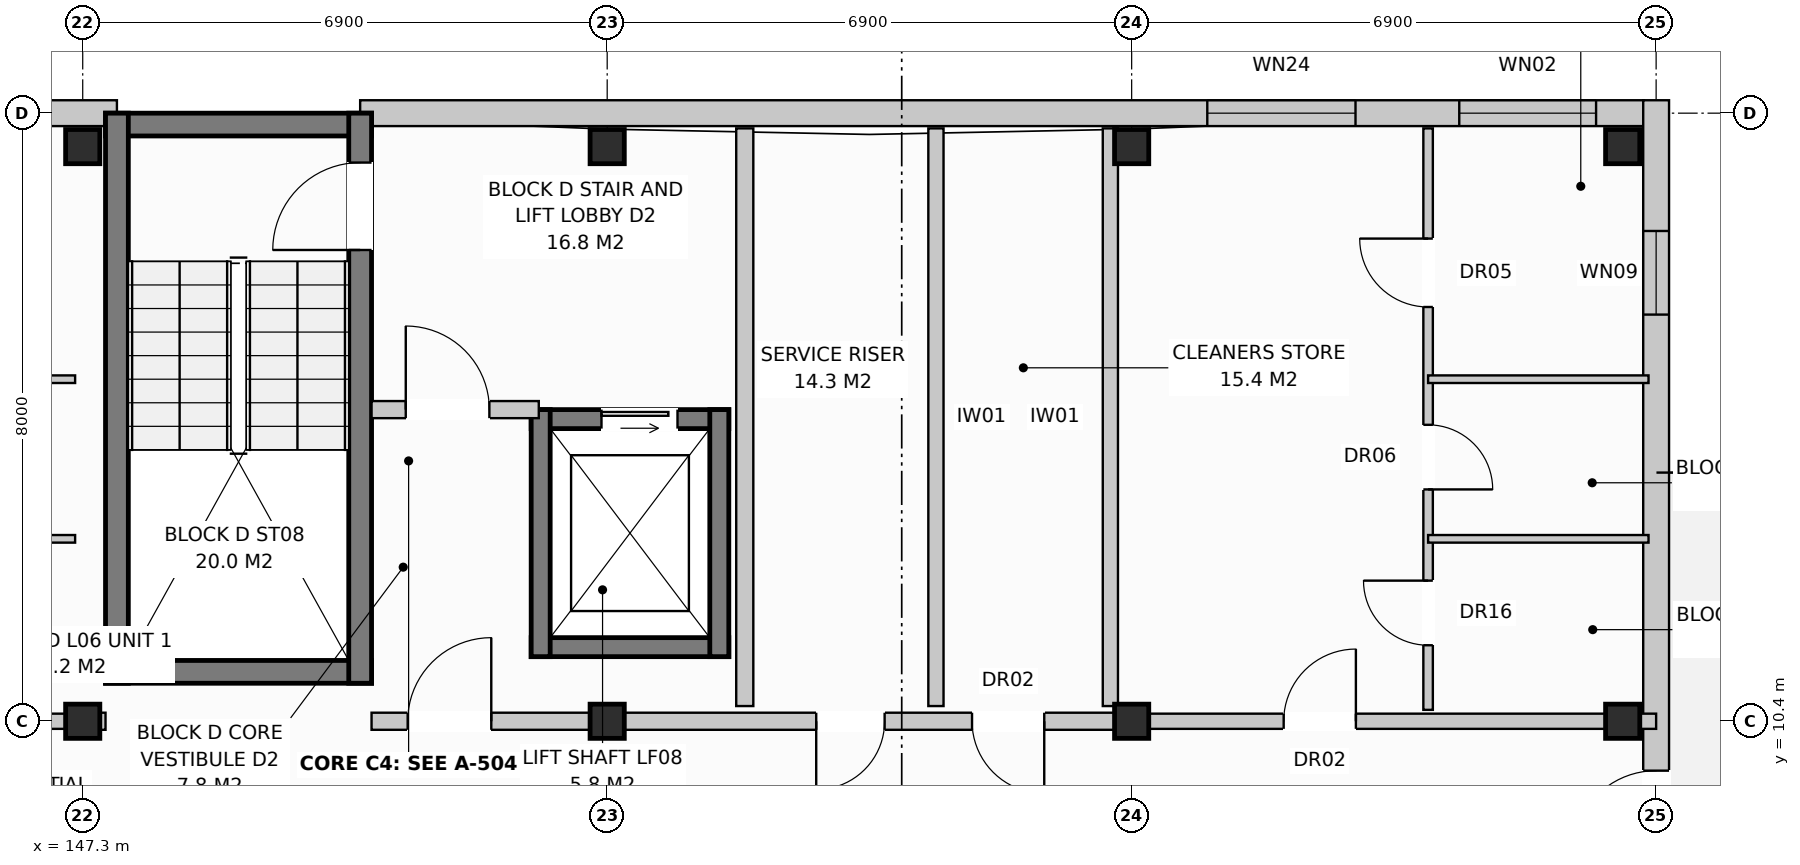
"""IFC4 building model, lengths in metres.
Left out: names, types, materials, properties, quantities, classifications, styles, units other than length and angle.
Written with IfcOpenShell. Run it as: python <this file> out.ifc"""

import sys

from ifc_helpers import new_model, si_unit, direction, frame, frame_2d, origin, origin_with_axes, origin_2d, place, context, subcontext, project, spatial, rectangle, extrude, element, fill, save


model = new_model("IFC4")
c1 = context("Model", 3, precision=1e-05, world=origin(), true_north=direction((0.0, 1.0)))
c2 = subcontext(c1, "Body", "Model", "MODEL_VIEW")
j1 = project(units=[si_unit("LENGTHUNIT", "METRE"), si_unit("PLANEANGLEUNIT", "RADIAN")], contexts=[c1])
p1 = place(None, origin())
s1 = spatial("IfcSite", under=j1, at=p1, CompositionType="ELEMENT")
p2 = place(p1, origin())
s2 = spatial("IfcBuilding", under=s1, at=p2, CompositionType="ELEMENT")
p3 = place(p2, frame((0.0, 0.0, 20.8)))
s3 = spatial("IfcBuildingStorey", under=s2, at=p3, CompositionType="ELEMENT", Elevation=20.8)
for number, where, z_axis, x_axis in (
    (1, (147.3, 10.4, 0.0), (0.0, 0.0, 1.0), (1.0, 0.0, 0.0)),
    (2, (147.3, 17.96, 0.0), (0.0, 0.0, 1.0), (1.0, 0.0, 0.0)),
    (3, (154.2, 10.4, 0.0), (0.0, 0.0, 1.0), (1.0, 0.0, 0.0)),
    (4, (154.2, 17.96, 0.0), (0.0, 0.0, 1.0), (1.0, 0.0, 0.0)),
    (5, (161.1, 10.4, 0.0), (0.0, 0.0, 1.0), (1.0, 0.0, 0.0)),
    (6, (161.1, 17.96, 0.0), (0.0, 0.0, 1.0), (1.0, 0.0, 0.0)),
    (7, (167.56, 10.4, 0.0), (0.0, 0.0, 1.0), (1.0, 0.0, 0.0)),
    (8, (167.56, 17.96, 0.0), (0.0, 0.0, 1.0), (1.0, 0.0, 0.0)),
):
    element("IfcColumn", number, at=place(p3, frame(where, z_axis=z_axis, x_axis=x_axis)), inside=s3, PredefinedType="COLUMN", context=c2, shape_type="SweptSolid", body=[
        extrude(rectangle(XDim=0.45, YDim=0.45, at=origin_2d()), origin(), (0.0, 0.0, 1.0), 3.2),
    ])
p4 = place(p3, frame((130.25, 18.4, 0.0), z_axis=(0.0, 0.0, 1.0), x_axis=(1.0, 0.0, 0.0)))
e9 = element("IfcWall", 9, at=p4, inside=s3, PredefinedType="STANDARD", context=c2, shape_type="SweptSolid", body=[
    extrude(rectangle(XDim=17.5, YDim=0.34, at=frame_2d((8.75, 0.0))), origin(), (0.0, 0.0, 1.0), 2.95),
])
p5 = place(p4, frame((11.981, 0.0, 0.0)))
e10 = element("IfcOpeningElement", 10, at=p5, cuts=e9, PredefinedType="OPENING", context=c2, shape_type="SweptSolid", body=[
    extrude(rectangle(XDim=0.95, YDim=2.1, at=frame_2d((0.475, 1.05))), frame((0.0, 0.182, 0.0), z_axis=(0.0, -1.0, 0.0), x_axis=(1.0, 0.0, 0.0)), (0.0, 0.0, 1.0), 0.364),
])
p6 = place(p4, frame((14.97, 0.0, 0.72)))
e11 = element("IfcOpeningElement", 11, at=p6, cuts=e9, PredefinedType="OPENING", context=c2, shape_type="SweptSolid", body=[
    extrude(rectangle(XDim=1.1, YDim=1.5, at=frame_2d((0.55, 0.75))), frame((0.0, 0.182, 0.0), z_axis=(0.0, -1.0, 0.0), x_axis=(1.0, 0.0, 0.0)), (0.0, 0.0, 1.0), 0.364),
])
p7 = place(p3, frame((150.95, 18.4, 0.0), z_axis=(0.0, 0.0, 1.0), x_axis=(1.0, 0.0, 0.0)))
e12 = element("IfcWall", 12, at=p7, inside=s3, PredefinedType="STANDARD", context=c2, shape_type="SweptSolid", body=[
    extrude(rectangle(XDim=16.89, YDim=0.34, at=frame_2d((8.445, 0.0))), origin(), (0.0, 0.0, 1.0), 2.95),
])
p8 = place(p7, frame((11.145, 0.0, 0.8)))
e13 = element("IfcOpeningElement", 13, at=p8, cuts=e12, PredefinedType="OPENING", context=c2, shape_type="SweptSolid", body=[
    extrude(rectangle(XDim=1.95, YDim=1.65, at=frame_2d((0.975, 0.825))), frame((0.0, 0.182, 0.0), z_axis=(0.0, -1.0, 0.0), x_axis=(1.0, 0.0, 0.0)), (0.0, 0.0, 1.0), 0.364),
])
p9 = place(p7, frame((14.46, 0.0, 0.8)))
e14 = element("IfcOpeningElement", 14, at=p9, cuts=e12, PredefinedType="OPENING", context=c2, shape_type="SweptSolid", body=[
    extrude(rectangle(XDim=1.8, YDim=1.7, at=frame_2d((0.9, 0.85))), frame((0.0, 0.182, 0.0), z_axis=(0.0, -1.0, 0.0), x_axis=(1.0, 0.0, 0.0)), (0.0, 0.0, 1.0), 0.364),
])
p10 = place(p3, frame((168.0, -0.17, 0.0), z_axis=(0.0, 0.0, 1.0), x_axis=(0.0, 1.0, 0.0)))
e15 = element("IfcWall", 15, at=p10, inside=s3, PredefinedType="STANDARD", context=c2, shape_type="SweptSolid", body=[
    extrude(rectangle(XDim=18.74, YDim=0.34, at=frame_2d((9.37, 0.0))), origin(), (0.0, 0.0, 1.0), 2.95),
])
p11 = place(p10, frame((8.82, 0.0, 0.0)))
e16 = element("IfcOpeningElement", 16, at=p11, cuts=e15, PredefinedType="OPENING", context=c2, shape_type="SweptSolid", body=[
    extrude(rectangle(XDim=1.1, YDim=2.1, at=frame_2d((0.55, 1.05))), frame((0.0, 0.182, 0.0), z_axis=(0.0, -1.0, 0.0), x_axis=(1.0, 0.0, 0.0)), (0.0, 0.0, 1.0), 0.364),
])
p12 = place(p10, frame((1.72, 0.0, 0.72)))
e17 = element("IfcOpeningElement", 17, at=p12, cuts=e15, PredefinedType="OPENING", context=c2, shape_type="SweptSolid", body=[
    extrude(rectangle(XDim=1.1, YDim=1.5, at=frame_2d((0.55, 0.75))), frame((0.0, 0.182, 0.0), z_axis=(0.0, -1.0, 0.0), x_axis=(1.0, 0.0, 0.0)), (0.0, 0.0, 1.0), 0.364),
])
p13 = place(p10, frame((15.92, 0.0, 0.72)))
e18 = element("IfcOpeningElement", 18, at=p13, cuts=e15, PredefinedType="OPENING", context=c2, shape_type="SweptSolid", body=[
    extrude(rectangle(XDim=1.1, YDim=1.5, at=frame_2d((0.55, 0.75))), frame((0.0, 0.182, 0.0), z_axis=(0.0, -1.0, 0.0), x_axis=(1.0, 0.0, 0.0)), (0.0, 0.0, 1.0), 0.364),
])
for number, where, z_axis, x_axis in (
    (19, (147.6, 18.25, 0.0), (0.0, 0.0, 1.0), (1.0, 0.0, 0.0)),
    (20, (147.6, 11.05, 0.0), (0.0, 0.0, 1.0), (1.0, 0.0, 0.0)),
):
    element("IfcWall", number, at=place(p3, frame(where, z_axis=z_axis, x_axis=x_axis)), inside=s3, PredefinedType="SHEAR", context=c2, shape_type="SweptSolid", body=[
        extrude(rectangle(XDim=3.5, YDim=0.3, at=frame_2d((1.75, 0.0))), origin(), (0.0, 0.0, 1.0), 2.95),
    ])
p14 = place(p3, frame((147.75, 10.9, 0.0), z_axis=(0.0, 0.0, 1.0), x_axis=(0.0, 1.0, 0.0)))
e21 = element("IfcWall", 21, at=p14, inside=s3, PredefinedType="SHEAR", context=c2, shape_type="SweptSolid", body=[
    extrude(rectangle(XDim=7.5, YDim=0.3, at=frame_2d((3.75, 0.0))), origin(), (0.0, 0.0, 1.0), 2.95),
])
p15 = place(p3, frame((150.95, 10.9, 0.0), z_axis=(0.0, 0.0, 1.0), x_axis=(0.0, 1.0, 0.0)))
e22 = element("IfcWall", 22, at=p15, inside=s3, PredefinedType="SHEAR", context=c2, shape_type="SweptSolid", body=[
    extrude(rectangle(XDim=7.5, YDim=0.3, at=frame_2d((3.75, 0.0))), origin(), (0.0, 0.0, 1.0), 2.95),
])
p16 = place(p15, frame((5.7, 0.0, 0.0)))
e23 = element("IfcOpeningElement", 23, at=p16, cuts=e22, PredefinedType="OPENING", context=c2, shape_type="SweptSolid", body=[
    extrude(rectangle(XDim=1.15, YDim=2.15, at=frame_2d((0.575, 1.075))), frame((0.0, 0.162, 0.0), z_axis=(0.0, -1.0, 0.0), x_axis=(1.0, 0.0, 0.0)), (0.0, 0.0, 1.0), 0.324),
])
p17 = place(p3, frame((153.2, 14.375, 0.0), z_axis=(0.0, 0.0, 1.0), x_axis=(1.0, 0.0, 0.0)))
e24 = element("IfcWall", 24, at=p17, inside=s3, PredefinedType="SHEAR", context=c2, shape_type="SweptSolid", body=[
    extrude(rectangle(XDim=2.6, YDim=0.25, at=frame_2d((1.3, 0.0))), origin(), (0.0, 0.0, 1.0), 2.95),
])
p18 = place(p17, frame((0.925, 0.0, 0.0)))
e25 = element("IfcOpeningElement", 25, at=p18, cuts=e24, PredefinedType="OPENING", context=c2, shape_type="SweptSolid", body=[
    extrude(rectangle(XDim=1.0, YDim=2.1, at=frame_2d((0.5, 1.05))), frame((0.0, 0.137, 0.0), z_axis=(0.0, -1.0, 0.0), x_axis=(1.0, 0.0, 0.0)), (0.0, 0.0, 1.0), 0.274),
])
p19 = place(p3, frame((153.2, 11.375, 0.0), z_axis=(0.0, 0.0, 1.0), x_axis=(1.0, 0.0, 0.0)))
e26 = element("IfcWall", 26, at=p19, inside=s3, PredefinedType="SHEAR", context=c2, shape_type="SweptSolid", body=[
    extrude(rectangle(XDim=2.6, YDim=0.25, at=frame_2d((1.3, 0.0))), origin(), (0.0, 0.0, 1.0), 2.95),
])
for number, where, z_axis, x_axis in (
    (27, (153.325, 11.25, 0.0), (0.0, 0.0, 1.0), (0.0, 1.0, 0.0)),
    (28, (155.675, 11.25, 0.0), (0.0, 0.0, 1.0), (0.0, 1.0, 0.0)),
):
    element("IfcWall", number, at=place(p3, frame(where, z_axis=z_axis, x_axis=x_axis)), inside=s3, PredefinedType="SHEAR", context=c2, shape_type="SweptSolid", body=[
        extrude(rectangle(XDim=3.25, YDim=0.25, at=frame_2d((1.625, 0.0))), origin(), (0.0, 0.0, 1.0), 2.95),
    ])
p20 = place(p3, frame((156.01, 10.6, 0.0), z_axis=(0.0, 0.0, 1.0), x_axis=(0.0, 1.0, 0.0)))
e29 = element("IfcWall", 29, at=p20, inside=s3, PredefinedType="PARTITIONING", context=c2, shape_type="SweptSolid", body=[
    extrude(rectangle(XDim=7.6, YDim=0.225, at=frame_2d((3.8, 0.0))), origin(), (0.0, 0.0, 1.0), 2.59),
])
p21 = place(p3, frame((151.1, 14.5, 0.0), z_axis=(0.0, 0.0, 1.0), x_axis=(1.0, 0.0, 0.0)))
e30 = element("IfcWall", 30, at=p21, inside=s3, PredefinedType="PARTITIONING", context=c2, shape_type="SweptSolid", body=[
    extrude(rectangle(XDim=2.2, YDim=0.225, at=frame_2d((1.1, 0.0))), origin(), (0.0, 0.0, 1.0), 2.95),
])
p22 = place(p21, frame((0.45, 0.0, 0.0)))
e31 = element("IfcOpeningElement", 31, at=p22, cuts=e30, PredefinedType="OPENING", context=c2, shape_type="SweptSolid", body=[
    extrude(rectangle(XDim=1.1, YDim=2.15, at=frame_2d((0.55, 1.075))), frame((0.0, 0.125, 0.0), z_axis=(0.0, -1.0, 0.0), x_axis=(1.0, 0.0, 0.0)), (0.0, 0.0, 1.0), 0.249),
])
p23 = place(p3, frame((147.3, 10.4, 0.0), z_axis=(0.0, 0.0, 1.0), x_axis=(1.0, 0.0, 0.0)))
e32 = element("IfcWall", 32, at=p23, inside=s3, PredefinedType="PARTITIONING", context=c2, shape_type="SweptSolid", body=[
    extrude(rectangle(XDim=0.3, YDim=0.225, at=frame_2d((0.15, 0.0))), origin(), (0.0, 0.0, 1.0), 2.95),
])
p24 = place(p3, frame((158.525, 10.6, 0.0), z_axis=(0.0, 0.0, 1.0), x_axis=(0.0, 1.0, 0.0)))
e33 = element("IfcWall", 33, at=p24, inside=s3, PredefinedType="PARTITIONING", context=c2, shape_type="SweptSolid", body=[
    extrude(rectangle(XDim=7.6, YDim=0.2, at=frame_2d((3.8, 0.0))), origin(), (0.0, 0.0, 1.0), 2.95),
])
p25 = place(p3, frame((160.82, 10.6, 0.0), z_axis=(0.0, 0.0, 1.0), x_axis=(0.0, 1.0, 0.0)))
e34 = element("IfcWall", 34, at=p25, inside=s3, PredefinedType="PARTITIONING", context=c2, shape_type="SweptSolid", body=[
    extrude(rectangle(XDim=7.6, YDim=0.2, at=frame_2d((3.8, 0.0))), origin(), (0.0, 0.0, 1.0), 2.39),
])
p26 = place(p3, frame((151.1, 10.4, 0.0), z_axis=(0.0, 0.0, 1.0), x_axis=(1.0, 0.0, 0.0)))
e35 = element("IfcWall", 35, at=p26, inside=s3, PredefinedType="PARTITIONING", context=c2, shape_type="SweptSolid", body=[
    extrude(rectangle(XDim=10.0, YDim=0.225, at=frame_2d((5.0, 0.0))), origin(), (0.0, 0.0, 1.0), 2.39),
])
p27 = place(p26, frame((0.475, 0.0, 0.0)))
e36 = element("IfcOpeningElement", 36, at=p27, cuts=e35, PredefinedType="OPENING", context=c2, shape_type="SweptSolid", body=[
    extrude(rectangle(XDim=1.1, YDim=2.15, at=frame_2d((0.55, 1.075))), frame((0.0, 0.125, 0.0), z_axis=(0.0, -1.0, 0.0), x_axis=(1.0, 0.0, 0.0)), (0.0, 0.0, 1.0), 0.249),
])
p28 = place(p26, frame((5.85, 0.0, 0.0)))
e37 = element("IfcOpeningElement", 37, at=p28, cuts=e35, PredefinedType="OPENING", context=c2, shape_type="SweptSolid", body=[
    extrude(rectangle(XDim=0.9, YDim=2.1, at=frame_2d((0.45, 1.05))), frame((0.0, 0.125, 0.0), z_axis=(0.0, -1.0, 0.0), x_axis=(1.0, 0.0, 0.0)), (0.0, 0.0, 1.0), 0.249),
])
p29 = place(p26, frame((7.9, 0.0, 0.0)))
e38 = element("IfcOpeningElement", 38, at=p29, cuts=e35, PredefinedType="OPENING", context=c2, shape_type="SweptSolid", body=[
    extrude(rectangle(XDim=0.95, YDim=2.15, at=frame_2d((0.475, 1.075))), frame((0.0, 0.125, 0.0), z_axis=(0.0, -1.0, 0.0), x_axis=(1.0, 0.0, 0.0)), (0.0, 0.0, 1.0), 0.249),
])
p30 = place(p3, frame((140.4, 10.4, 0.0), z_axis=(0.0, 0.0, 1.0), x_axis=(1.0, 0.0, 0.0)))
e39 = element("IfcWall", 39, at=p30, inside=s3, PredefinedType="PARTITIONING", context=c2, shape_type="SweptSolid", body=[
    extrude(rectangle(XDim=6.9, YDim=0.2, at=frame_2d((3.45, 0.0))), origin(), (0.0, 0.0, 1.0), 2.39),
])
p31 = place(p30, frame((2.0, 0.0, 0.0)))
e40 = element("IfcOpeningElement", 40, at=p31, cuts=e39, PredefinedType="OPENING", context=c2, shape_type="SweptSolid", body=[
    extrude(rectangle(XDim=0.95, YDim=2.15, at=frame_2d((0.475, 1.075))), frame((0.0, 0.112, 0.0), z_axis=(0.0, -1.0, 0.0), x_axis=(1.0, 0.0, 0.0)), (0.0, 0.0, 1.0), 0.224),
])
for number, where, z_axis, x_axis in (
    (41, (144.3, 12.8, 0.0), (0.0, 0.0, 1.0), (1.0, 0.0, 0.0)),
    (42, (144.3, 14.9, 0.0), (0.0, 0.0, 1.0), (1.0, 0.0, 0.0)),
):
    element("IfcWall", number, at=place(p3, frame(where, z_axis=z_axis, x_axis=x_axis)), inside=s3, PredefinedType="PARTITIONING", context=c2, shape_type="SweptSolid", body=[
        extrude(rectangle(XDim=2.9, YDim=0.1, at=frame_2d((1.45, 0.0))), origin(), (0.0, 0.0, 1.0), 2.95),
    ])
p32 = place(p3, frame((161.1, 10.4, 0.0), z_axis=(0.0, 0.0, 1.0), x_axis=(1.0, 0.0, 0.0)))
e43 = element("IfcWall", 43, at=p32, inside=s3, PredefinedType="PARTITIONING", context=c2, shape_type="SweptSolid", body=[
    extrude(rectangle(XDim=6.9, YDim=0.2, at=frame_2d((3.45, 0.0))), origin(), (0.0, 0.0, 1.0), 2.39),
])
p33 = place(p32, frame((2.0, 0.0, 0.0)))
e44 = element("IfcOpeningElement", 44, at=p33, cuts=e43, PredefinedType="OPENING", context=c2, shape_type="SweptSolid", body=[
    extrude(rectangle(XDim=0.95, YDim=2.15, at=frame_2d((0.475, 1.075))), frame((0.0, 0.112, 0.0), z_axis=(0.0, -1.0, 0.0), x_axis=(1.0, 0.0, 0.0)), (0.0, 0.0, 1.0), 0.224),
])
p34 = place(p3, frame((165.0, 10.55, 0.0), z_axis=(0.0, 0.0, 1.0), x_axis=(0.0, 1.0, 0.0)))
e45 = element("IfcWall", 45, at=p34, inside=s3, PredefinedType="PARTITIONING", context=c2, shape_type="SweptSolid", body=[
    extrude(rectangle(XDim=7.65, YDim=0.125, at=frame_2d((3.825, 0.0))), origin(), (0.0, 0.0, 1.0), 2.59),
])
p35 = place(p34, frame((0.85, 0.0, 0.0)))
e46 = element("IfcOpeningElement", 46, at=p35, cuts=e45, PredefinedType="OPENING", context=c2, shape_type="SweptSolid", body=[
    extrude(rectangle(XDim=0.85, YDim=2.1, at=frame_2d((0.425, 1.05))), frame((0.0, 0.074, 0.0), z_axis=(0.0, -1.0, 0.0), x_axis=(1.0, 0.0, 0.0)), (0.0, 0.0, 1.0), 0.149),
])
p36 = place(p34, frame((2.9, 0.0, 0.0)))
e47 = element("IfcOpeningElement", 47, at=p36, cuts=e45, PredefinedType="OPENING", context=c2, shape_type="SweptSolid", body=[
    extrude(rectangle(XDim=0.85, YDim=2.05, at=frame_2d((0.425, 1.025))), frame((0.0, 0.074, 0.0), z_axis=(0.0, -1.0, 0.0), x_axis=(1.0, 0.0, 0.0)), (0.0, 0.0, 1.0), 0.149),
])
p37 = place(p34, frame((5.3, 0.0, 0.0)))
e48 = element("IfcOpeningElement", 48, at=p37, cuts=e45, PredefinedType="OPENING", context=c2, shape_type="SweptSolid", body=[
    extrude(rectangle(XDim=0.9, YDim=2.1, at=frame_2d((0.45, 1.05))), frame((0.0, 0.074, 0.0), z_axis=(0.0, -1.0, 0.0), x_axis=(1.0, 0.0, 0.0)), (0.0, 0.0, 1.0), 0.149),
])
for number, where, z_axis, x_axis in (
    (49, (165.0, 12.8, 0.0), (0.0, 0.0, 1.0), (1.0, 0.0, 0.0)),
    (50, (165.0, 14.9, 0.0), (0.0, 0.0, 1.0), (1.0, 0.0, 0.0)),
):
    element("IfcWall", number, at=place(p3, frame(where, z_axis=z_axis, x_axis=x_axis)), inside=s3, PredefinedType="PARTITIONING", context=c2, shape_type="SweptSolid", body=[
        extrude(rectangle(XDim=2.9, YDim=0.1, at=frame_2d((1.45, 0.0))), origin(), (0.0, 0.0, 1.0), 2.95),
    ])
p38 = place(p8, origin_with_axes())
e51 = element("IfcWindow", 51, at=p38, inside=s3, PartitioningType="SINGLE_PANEL", PredefinedType="WINDOW", context=c2, shape_type="SweptSolid", body=[
    extrude(rectangle(XDim=1.95, YDim=1.65, at=frame_2d((0.975, 0.825))), frame((0.0, 0.03, 0.0), z_axis=(0.0, -1.0, 0.0), x_axis=(1.0, 0.0, 0.0)), (0.0, 0.0, 1.0), 0.06),
])
fill(e13, e51)
p39 = place(p9, origin_with_axes())
e52 = element("IfcWindow", 52, at=p39, inside=s3, PartitioningType="SINGLE_PANEL", PredefinedType="WINDOW", context=c2, shape_type="SweptSolid", body=[
    extrude(rectangle(XDim=1.8, YDim=1.7, at=frame_2d((0.9, 0.85))), frame((0.0, 0.03, 0.0), z_axis=(0.0, -1.0, 0.0), x_axis=(1.0, 0.0, 0.0)), (0.0, 0.0, 1.0), 0.06),
])
fill(e14, e52)
p40 = place(p11, origin_with_axes())
e53 = element("IfcDoor", 53, at=p40, inside=s3, OperationType="SINGLE_SWING_LEFT", PredefinedType="DOOR", context=c2, shape_type="SweptSolid", body=[
    extrude(rectangle(XDim=1.1, YDim=2.1, at=frame_2d((0.55, 1.05))), frame((0.0, 0.025, 0.0), z_axis=(0.0, -1.0, 0.0), x_axis=(1.0, 0.0, 0.0)), (0.0, 0.0, 1.0), 0.05),
])
fill(e16, e53)
p41 = place(p13, origin_with_axes())
e54 = element("IfcWindow", 54, at=p41, inside=s3, PartitioningType="SINGLE_PANEL", PredefinedType="WINDOW", context=c2, shape_type="SweptSolid", body=[
    extrude(rectangle(XDim=1.1, YDim=1.5, at=frame_2d((0.55, 0.75))), frame((0.0, 0.03, 0.0), z_axis=(0.0, -1.0, 0.0), x_axis=(1.0, 0.0, 0.0)), (0.0, 0.0, 1.0), 0.06),
])
fill(e18, e54)
p42 = place(p16, origin_with_axes())
e55 = element("IfcDoor", 55, at=p42, inside=s3, OperationType="SINGLE_SWING_LEFT", PredefinedType="DOOR", context=c2, shape_type="SweptSolid", body=[
    extrude(rectangle(XDim=1.15, YDim=2.15, at=frame_2d((0.575, 1.075))), frame((0.0, 0.025, 0.0), z_axis=(0.0, -1.0, 0.0), x_axis=(1.0, 0.0, 0.0)), (0.0, 0.0, 1.0), 0.05),
])
fill(e23, e55)
p43 = place(p18, origin_with_axes())
e56 = element("IfcDoor", 56, at=p43, inside=s3, OperationType="SLIDING_TO_LEFT", PredefinedType="DOOR", context=c2, shape_type="SweptSolid", body=[
    extrude(rectangle(XDim=1.0, YDim=2.1, at=frame_2d((0.5, 1.05))), frame((0.0, 0.025, 0.0), z_axis=(0.0, -1.0, 0.0), x_axis=(1.0, 0.0, 0.0)), (0.0, 0.0, 1.0), 0.05),
])
fill(e25, e56)
p44 = place(p22, origin_with_axes())
e57 = element("IfcDoor", 57, at=p44, inside=s3, OperationType="SINGLE_SWING_LEFT", PredefinedType="DOOR", context=c2, shape_type="SweptSolid", body=[
    extrude(rectangle(XDim=1.1, YDim=2.15, at=frame_2d((0.55, 1.075))), frame((0.0, 0.025, 0.0), z_axis=(0.0, -1.0, 0.0), x_axis=(1.0, 0.0, 0.0)), (0.0, 0.0, 1.0), 0.05),
])
fill(e31, e57)
p45 = place(p27, origin_with_axes())
e58 = element("IfcDoor", 58, at=p45, inside=s3, OperationType="SINGLE_SWING_RIGHT", PredefinedType="DOOR", context=c2, shape_type="SweptSolid", body=[
    extrude(rectangle(XDim=1.1, YDim=2.15, at=frame_2d((0.55, 1.075))), frame((0.0, 0.025, 0.0), z_axis=(0.0, -1.0, 0.0), x_axis=(1.0, 0.0, 0.0)), (0.0, 0.0, 1.0), 0.05),
])
fill(e36, e58)
p46 = place(p28, frame((0.9, 0.0, 0.0), z_axis=(0.0, 0.0, 1.0), x_axis=(-1.0, 0.0, 0.0)))
e59 = element("IfcDoor", 59, at=p46, inside=s3, OperationType="SINGLE_SWING_LEFT", PredefinedType="DOOR", context=c2, shape_type="SweptSolid", body=[
    extrude(rectangle(XDim=0.9, YDim=2.1, at=frame_2d((0.45, 1.05))), frame((0.0, 0.025, 0.0), z_axis=(0.0, -1.0, 0.0), x_axis=(1.0, 0.0, 0.0)), (0.0, 0.0, 1.0), 0.05),
])
fill(e37, e59)
p47 = place(p29, frame((0.95, 0.0, 0.0), z_axis=(0.0, 0.0, 1.0), x_axis=(-1.0, 0.0, 0.0)))
e60 = element("IfcDoor", 60, at=p47, inside=s3, OperationType="SINGLE_SWING_RIGHT", PredefinedType="DOOR", context=c2, shape_type="SweptSolid", body=[
    extrude(rectangle(XDim=0.95, YDim=2.15, at=frame_2d((0.475, 1.075))), frame((0.0, 0.025, 0.0), z_axis=(0.0, -1.0, 0.0), x_axis=(1.0, 0.0, 0.0)), (0.0, 0.0, 1.0), 0.05),
])
fill(e38, e60)
p48 = place(p33, origin_with_axes())
e61 = element("IfcDoor", 61, at=p48, inside=s3, OperationType="SINGLE_SWING_RIGHT", PredefinedType="DOOR", context=c2, shape_type="SweptSolid", body=[
    extrude(rectangle(XDim=0.95, YDim=2.15, at=frame_2d((0.475, 1.075))), frame((0.0, 0.025, 0.0), z_axis=(0.0, -1.0, 0.0), x_axis=(1.0, 0.0, 0.0)), (0.0, 0.0, 1.0), 0.05),
])
fill(e44, e61)
p49 = place(p35, origin_with_axes())
e62 = element("IfcDoor", 62, at=p49, inside=s3, OperationType="SINGLE_SWING_RIGHT", PredefinedType="DOOR", context=c2, shape_type="SweptSolid", body=[
    extrude(rectangle(XDim=0.85, YDim=2.1, at=frame_2d((0.425, 1.05))), frame((0.0, 0.025, 0.0), z_axis=(0.0, -1.0, 0.0), x_axis=(1.0, 0.0, 0.0)), (0.0, 0.0, 1.0), 0.05),
])
fill(e46, e62)
p50 = place(p36, frame((0.85, 0.0, 0.0), z_axis=(0.0, 0.0, 1.0), x_axis=(-1.0, 0.0, 0.0)))
e63 = element("IfcDoor", 63, at=p50, inside=s3, OperationType="SINGLE_SWING_LEFT", PredefinedType="DOOR", context=c2, shape_type="SweptSolid", body=[
    extrude(rectangle(XDim=0.85, YDim=2.05, at=frame_2d((0.425, 1.025))), frame((0.0, 0.025, 0.0), z_axis=(0.0, -1.0, 0.0), x_axis=(1.0, 0.0, 0.0)), (0.0, 0.0, 1.0), 0.05),
])
fill(e47, e63)
p51 = place(p37, origin_with_axes())
e64 = element("IfcDoor", 64, at=p51, inside=s3, OperationType="SINGLE_SWING_RIGHT", PredefinedType="DOOR", context=c2, shape_type="SweptSolid", body=[
    extrude(rectangle(XDim=0.9, YDim=2.1, at=frame_2d((0.45, 1.05))), frame((0.0, 0.025, 0.0), z_axis=(0.0, -1.0, 0.0), x_axis=(1.0, 0.0, 0.0)), (0.0, 0.0, 1.0), 0.05),
])
fill(e48, e64)
save(model, sys.argv[1])
